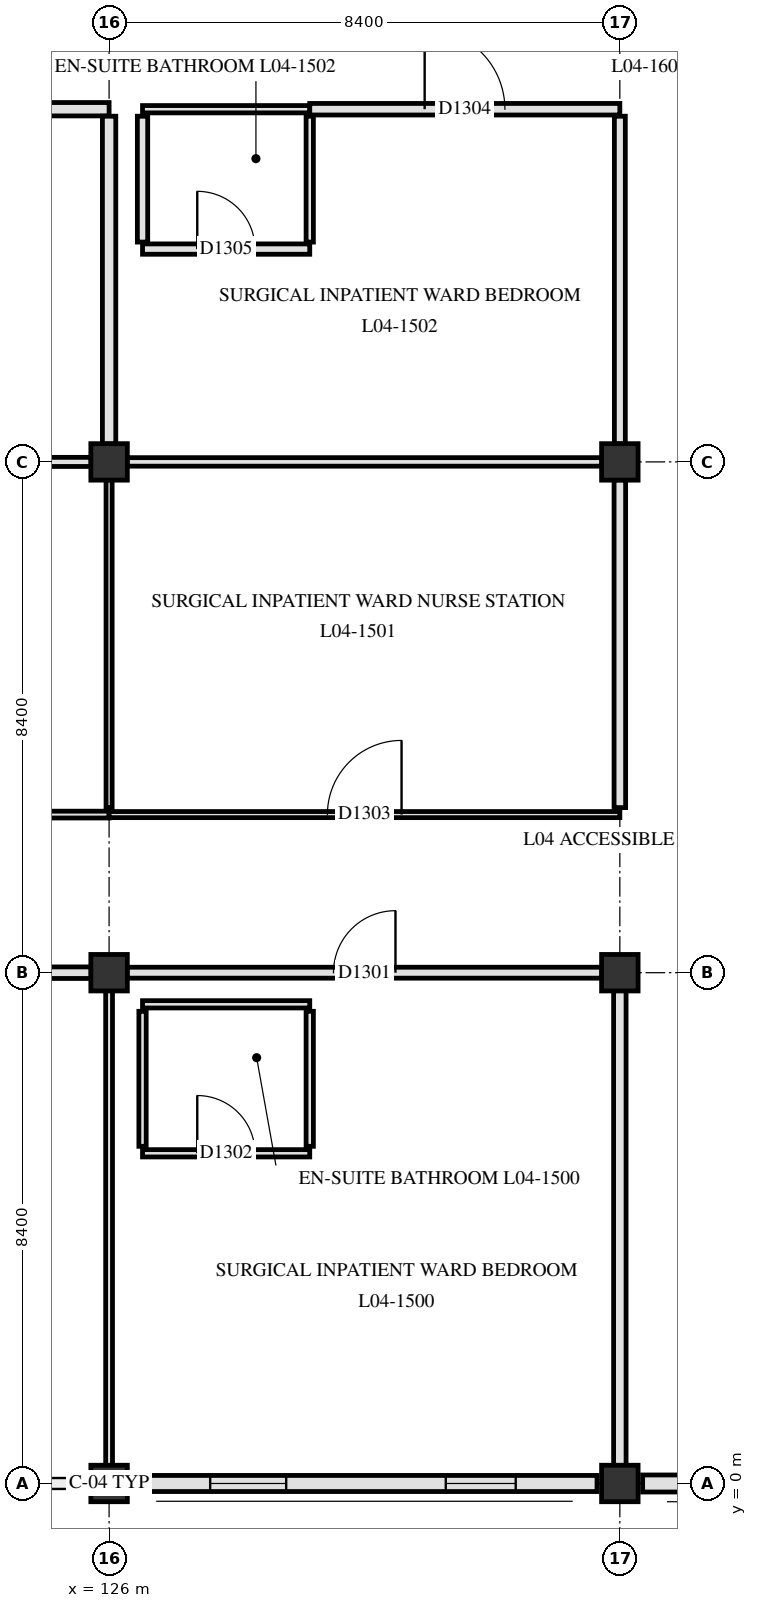
"""IFC4 building model, lengths in metres.
Left out: names, types, materials, properties, quantities, classifications, styles, units other than length and angle.
Written with IfcOpenShell. Run it as: python <this file> out.ifc"""

import sys

from ifc_helpers import new_model, si_unit, direction, frame, frame_2d, origin, origin_2d, place, context, subcontext, project, spatial, rectangle, extrude, element, fill, save


model = new_model("IFC4")
c1 = context("Model", 3, precision=1e-05, world=origin(), true_north=direction((0.0, 1.0)))
c2 = subcontext(c1, "Body", "Model", "MODEL_VIEW")
j1 = project(units=[si_unit("LENGTHUNIT", "METRE"), si_unit("PLANEANGLEUNIT", "RADIAN")], contexts=[c1])
p1 = place(None, origin())
s1 = spatial("IfcSite", under=j1, at=p1, CompositionType="ELEMENT")
p2 = place(p1, origin())
s2 = spatial("IfcBuilding", under=s1, at=p2, CompositionType="ELEMENT")
p3 = place(p2, frame((0.0, 0.0, 18.6)))
s3 = spatial("IfcBuildingStorey", under=s2, at=p3, CompositionType="ELEMENT", Elevation=18.6)
for number, where, z_axis, x_axis in (
    (1, (126.0, 0.0, 0.0), (0.0, 0.0, 1.0), (1.0, 0.0, 0.0)),
    (2, (126.0, 8.4, 0.0), (0.0, 0.0, 1.0), (1.0, 0.0, 0.0)),
    (3, (126.0, 16.8, 0.0), (0.0, 0.0, 1.0), (1.0, 0.0, 0.0)),
    (4, (134.4, 0.0, 0.0), (0.0, 0.0, 1.0), (1.0, 0.0, 0.0)),
    (5, (134.4, 8.4, 0.0), (0.0, 0.0, 1.0), (1.0, 0.0, 0.0)),
    (6, (134.4, 16.8, 0.0), (0.0, 0.0, 1.0), (1.0, 0.0, 0.0)),
):
    element("IfcColumn", number, at=place(p3, frame(where, z_axis=z_axis, x_axis=x_axis)), inside=s3, PredefinedType="COLUMN", context=c2, shape_type="SweptSolid", body=[
        extrude(rectangle(XDim=0.6, YDim=0.6, at=origin_2d()), origin(), (0.0, 0.0, 1.0), 3.9),
    ])
p4 = place(p3, frame((142.425, 0.0, 0.0), z_axis=(0.0, 0.0, 1.0), x_axis=(-1.0, 0.0, 0.0)))
e7 = element("IfcWall", 7, at=p4, inside=s3, PredefinedType="SOLIDWALL", context=c2, shape_type="SweptSolid", body=[
    extrude(rectangle(XDim=7.65, YDim=0.28, at=frame_2d((3.825, 0.0))), origin(), (0.0, 0.0, 1.0), 3.31),
])
p5 = place(p4, frame((0.962, 0.0, 0.85)))
e8 = element("IfcOpeningElement", 8, at=p5, cuts=e7, PredefinedType="OPENING", context=c2, shape_type="SweptSolid", body=[
    extrude(rectangle(XDim=1.9, YDim=1.42, at=frame_2d((0.95, 0.71))), frame((0.0, 0.15, 0.0), z_axis=(0.0, -1.0, 0.0), x_axis=(1.0, 0.0, 0.0)), (0.0, 0.0, 1.0), 0.3),
])
p6 = place(p4, frame((5.212, 0.0, 0.85)))
e9 = element("IfcOpeningElement", 9, at=p6, cuts=e7, PredefinedType="OPENING", context=c2, shape_type="SweptSolid", body=[
    extrude(rectangle(XDim=1.05, YDim=1.54, at=frame_2d((0.525, 0.77))), frame((0.0, 0.15, 0.0), z_axis=(0.0, -1.0, 0.0), x_axis=(1.0, 0.0, 0.0)), (0.0, 0.0, 1.0), 0.3),
])
p7 = place(p3, frame((134.025, 0.0, 0.0), z_axis=(0.0, 0.0, 1.0), x_axis=(-1.0, 0.0, 0.0)))
e10 = element("IfcWall", 10, at=p7, inside=s3, PredefinedType="SOLIDWALL", context=c2, shape_type="SweptSolid", body=[
    extrude(rectangle(XDim=7.65, YDim=0.265, at=frame_2d((3.825, 0.0))), origin(), (0.0, 0.0, 1.0), 3.31),
])
p8 = place(p7, frame((1.337, 0.0, 0.85)))
e11 = element("IfcOpeningElement", 11, at=p8, cuts=e10, PredefinedType="OPENING", context=c2, shape_type="SweptSolid", body=[
    extrude(rectangle(XDim=1.15, YDim=1.54, at=frame_2d((0.575, 0.77))), frame((0.0, 0.142, 0.0), z_axis=(0.0, -1.0, 0.0), x_axis=(1.0, 0.0, 0.0)), (0.0, 0.0, 1.0), 0.285),
])
p9 = place(p7, frame((5.113, 0.0, 0.85)))
e12 = element("IfcOpeningElement", 12, at=p9, cuts=e10, PredefinedType="OPENING", context=c2, shape_type="SweptSolid", body=[
    extrude(rectangle(XDim=1.25, YDim=1.54, at=frame_2d((0.625, 0.77))), frame((0.0, 0.142, 0.0), z_axis=(0.0, -1.0, 0.0), x_axis=(1.0, 0.0, 0.0)), (0.0, 0.0, 1.0), 0.285),
])
p10 = place(p3, frame((126.55, 5.43, 0.0), z_axis=(0.0, 0.0, 1.0), x_axis=(1.0, 0.0, 0.0)))
e13 = element("IfcWall", 13, at=p10, inside=s3, PredefinedType="PARTITIONING", context=c2, shape_type="SweptSolid", body=[
    extrude(rectangle(XDim=2.75, YDim=0.12, at=frame_2d((1.375, 0.0))), origin(), (0.0, 0.0, 1.0), 3.61),
])
p11 = place(p10, frame((0.9, 0.0, 0.0)))
e14 = element("IfcOpeningElement", 14, at=p11, cuts=e13, PredefinedType="OPENING", context=c2, shape_type="SweptSolid", body=[
    extrude(rectangle(XDim=0.95, YDim=2.1, at=frame_2d((0.475, 1.05))), frame((0.0, 0.07, 0.0), z_axis=(0.0, -1.0, 0.0), x_axis=(1.0, 0.0, 0.0)), (0.0, 0.0, 1.0), 0.14),
])
p12 = place(p3, frame((126.55, 7.88, 0.0), z_axis=(0.0, 0.0, 1.0), x_axis=(1.0, 0.0, 0.0)))
e15 = element("IfcWall", 15, at=p12, inside=s3, PredefinedType="PARTITIONING", context=c2, shape_type="SweptSolid", body=[
    extrude(rectangle(XDim=2.75, YDim=0.12, at=frame_2d((1.375, 0.0))), origin(), (0.0, 0.0, 1.0), 3.61),
])
p13 = place(p3, frame((117.895, 8.4, 0.0), z_axis=(0.0, 0.0, 1.0), x_axis=(1.0, 0.0, 0.0)))
e16 = element("IfcWall", 16, at=p13, inside=s3, PredefinedType="PARTITIONING", context=c2, shape_type="SweptSolid", body=[
    extrude(rectangle(XDim=7.81, YDim=0.19, at=frame_2d((3.905, 0.0))), origin(), (0.0, 0.0, 1.0), 3.16),
])
p14 = place(p13, frame((3.28, 0.0, 0.0)))
e17 = element("IfcOpeningElement", 17, at=p14, cuts=e16, PredefinedType="OPENING", context=c2, shape_type="SweptSolid", body=[
    extrude(rectangle(XDim=1.25, YDim=2.2, at=frame_2d((0.625, 1.1))), frame((0.0, 0.105, 0.0), z_axis=(0.0, -1.0, 0.0), x_axis=(1.0, 0.0, 0.0)), (0.0, 0.0, 1.0), 0.21),
])
p15 = place(p3, frame((126.295, 8.4, 0.0), z_axis=(0.0, 0.0, 1.0), x_axis=(1.0, 0.0, 0.0)))
e18 = element("IfcWall", 18, at=p15, inside=s3, PredefinedType="PARTITIONING", context=c2, shape_type="SweptSolid", body=[
    extrude(rectangle(XDim=7.81, YDim=0.18, at=frame_2d((3.905, 0.0))), origin(), (0.0, 0.0, 1.0), 3.16),
])
p16 = place(p15, frame((3.395, 0.0, 0.0)))
e19 = element("IfcOpeningElement", 19, at=p16, cuts=e18, PredefinedType="OPENING", context=c2, shape_type="SweptSolid", body=[
    extrude(rectangle(XDim=1.02, YDim=2.12, at=frame_2d((0.51, 1.06))), frame((0.0, 0.1, 0.0), z_axis=(0.0, -1.0, 0.0), x_axis=(1.0, 0.0, 0.0)), (0.0, 0.0, 1.0), 0.2),
])
p17 = place(p3, frame((117.6, 11.0, 0.0), z_axis=(0.0, 0.0, 1.0), x_axis=(1.0, 0.0, 0.0)))
e20 = element("IfcWall", 20, at=p17, inside=s3, PredefinedType="PARTITIONING", context=c2, shape_type="SweptSolid", body=[
    extrude(rectangle(XDim=8.4, YDim=0.112, at=frame_2d((4.2, 0.0))), origin(), (0.0, 0.0, 1.0), 3.26),
])
p18 = place(p17, frame((3.46, 0.0, 0.0)))
e21 = element("IfcOpeningElement", 21, at=p18, cuts=e20, PredefinedType="OPENING", context=c2, shape_type="SweptSolid", body=[
    extrude(rectangle(XDim=1.48, YDim=2.22, at=frame_2d((0.74, 1.11))), frame((0.0, 0.066, 0.0), z_axis=(0.0, -1.0, 0.0), x_axis=(1.0, 0.0, 0.0)), (0.0, 0.0, 1.0), 0.132),
])
p19 = place(p3, frame((126.0, 11.0, 0.0), z_axis=(0.0, 0.0, 1.0), x_axis=(1.0, 0.0, 0.0)))
e22 = element("IfcWall", 22, at=p19, inside=s3, PredefinedType="PARTITIONING", context=c2, shape_type="SweptSolid", body=[
    extrude(rectangle(XDim=8.4, YDim=0.1, at=frame_2d((4.2, 0.0))), origin(), (0.0, 0.0, 1.0), 3.26),
])
p20 = place(p19, frame((3.59, 0.0, 0.0)))
e23 = element("IfcOpeningElement", 23, at=p20, cuts=e22, PredefinedType="OPENING", context=c2, shape_type="SweptSolid", body=[
    extrude(rectangle(XDim=1.22, YDim=2.18, at=frame_2d((0.61, 1.09))), frame((0.0, 0.06, 0.0), z_axis=(0.0, -1.0, 0.0), x_axis=(1.0, 0.0, 0.0)), (0.0, 0.0, 1.0), 0.12),
])
p21 = place(p3, frame((117.895, 16.8, 0.0), z_axis=(0.0, 0.0, 1.0), x_axis=(1.0, 0.0, 0.0)))
e24 = element("IfcWall", 24, at=p21, inside=s3, PredefinedType="PARTITIONING", context=c2, shape_type="SweptSolid", body=[
    extrude(rectangle(XDim=7.81, YDim=0.15, at=frame_2d((3.905, 0.0))), origin(), (0.0, 0.0, 1.0), 3.16),
])
p22 = place(p3, frame((126.295, 16.8, 0.0), z_axis=(0.0, 0.0, 1.0), x_axis=(1.0, 0.0, 0.0)))
e25 = element("IfcWall", 25, at=p22, inside=s3, PredefinedType="PARTITIONING", context=c2, shape_type="SweptSolid", body=[
    extrude(rectangle(XDim=7.81, YDim=0.14, at=frame_2d((3.905, 0.0))), origin(), (0.0, 0.0, 1.0), 3.16),
])
p23 = place(p3, frame((126.55, 20.3, 0.0), z_axis=(0.0, 0.0, 1.0), x_axis=(1.0, 0.0, 0.0)))
e26 = element("IfcWall", 26, at=p23, inside=s3, PredefinedType="PARTITIONING", context=c2, shape_type="SweptSolid", body=[
    extrude(rectangle(XDim=2.75, YDim=0.17, at=frame_2d((1.375, 0.0))), origin(), (0.0, 0.0, 1.0), 3.61),
])
p24 = place(p23, frame((0.9, 0.0, 0.0)))
e27 = element("IfcOpeningElement", 27, at=p24, cuts=e26, PredefinedType="OPENING", context=c2, shape_type="SweptSolid", body=[
    extrude(rectangle(XDim=0.95, YDim=2.1, at=frame_2d((0.475, 1.05))), frame((0.0, 0.095, 0.0), z_axis=(0.0, -1.0, 0.0), x_axis=(1.0, 0.0, 0.0)), (0.0, 0.0, 1.0), 0.19),
])
p25 = place(p3, frame((120.9, 22.6, 0.0), z_axis=(0.0, 0.0, 1.0), x_axis=(1.0, 0.0, 0.0)))
e28 = element("IfcWall", 28, at=p25, inside=s3, PredefinedType="PARTITIONING", context=c2, shape_type="SweptSolid", body=[
    extrude(rectangle(XDim=5.1, YDim=0.22, at=frame_2d((2.55, 0.0))), origin(), (0.0, 0.0, 1.0), 3.26),
])
p26 = place(p25, frame((1.78, 0.0, 0.0)))
e29 = element("IfcOpeningElement", 29, at=p26, cuts=e28, PredefinedType="OPENING", context=c2, shape_type="SweptSolid", body=[
    extrude(rectangle(XDim=1.54, YDim=2.24, at=frame_2d((0.77, 1.12))), frame((0.0, 0.12, 0.0), z_axis=(0.0, -1.0, 0.0), x_axis=(1.0, 0.0, 0.0)), (0.0, 0.0, 1.0), 0.24),
])
p27 = place(p3, frame((126.55, 22.6, 0.0), z_axis=(0.0, 0.0, 1.0), x_axis=(1.0, 0.0, 0.0)))
e30 = element("IfcWall", 30, at=p27, inside=s3, PredefinedType="PARTITIONING", context=c2, shape_type="SweptSolid", body=[
    extrude(rectangle(XDim=2.75, YDim=0.12, at=frame_2d((1.375, 0.0))), origin(), (0.0, 0.0, 1.0), 3.61),
])
p28 = place(p3, frame((129.3, 22.6, 0.0), z_axis=(0.0, 0.0, 1.0), x_axis=(1.0, 0.0, 0.0)))
e31 = element("IfcWall", 31, at=p28, inside=s3, PredefinedType="PARTITIONING", context=c2, shape_type="SweptSolid", body=[
    extrude(rectangle(XDim=5.1, YDim=0.19, at=frame_2d((2.55, 0.0))), origin(), (0.0, 0.0, 1.0), 3.26),
])
p29 = place(p28, frame((1.89, 0.0, 0.0)))
e32 = element("IfcOpeningElement", 32, at=p29, cuts=e31, PredefinedType="OPENING", context=c2, shape_type="SweptSolid", body=[
    extrude(rectangle(XDim=1.32, YDim=2.18, at=frame_2d((0.66, 1.09))), frame((0.0, 0.105, 0.0), z_axis=(0.0, -1.0, 0.0), x_axis=(1.0, 0.0, 0.0)), (0.0, 0.0, 1.0), 0.21),
])
p30 = place(p3, frame((126.0, 0.295, 0.0), z_axis=(0.0, 0.0, 1.0), x_axis=(0.0, 1.0, 0.0)))
e33 = element("IfcWall", 33, at=p30, inside=s3, PredefinedType="PARTITIONING", context=c2, shape_type="SweptSolid", body=[
    extrude(rectangle(XDim=7.81, YDim=0.112, at=frame_2d((3.905, 0.0))), origin(), (0.0, 0.0, 1.0), 3.26),
])
p31 = place(p3, frame((126.0, 11.115, 0.0), z_axis=(0.0, 0.0, 1.0), x_axis=(0.0, 1.0, 0.0)))
e34 = element("IfcWall", 34, at=p31, inside=s3, PredefinedType="PARTITIONING", context=c2, shape_type="SweptSolid", body=[
    extrude(rectangle(XDim=5.39, YDim=0.1, at=frame_2d((2.695, 0.0))), origin(), (0.0, 0.0, 1.0), 3.26),
])
p32 = place(p3, frame((126.0, 17.095, 0.0), z_axis=(0.0, 0.0, 1.0), x_axis=(0.0, 1.0, 0.0)))
e35 = element("IfcWall", 35, at=p32, inside=s3, PredefinedType="PARTITIONING", context=c2, shape_type="SweptSolid", body=[
    extrude(rectangle(XDim=5.39, YDim=0.22, at=frame_2d((2.695, 0.0))), origin(), (0.0, 0.0, 1.0), 3.26),
])
p33 = place(p3, frame((126.55, 5.545, 0.0), z_axis=(0.0, 0.0, 1.0), x_axis=(0.0, 1.0, 0.0)))
e36 = element("IfcWall", 36, at=p33, inside=s3, PredefinedType="PARTITIONING", context=c2, shape_type="SweptSolid", body=[
    extrude(rectangle(XDim=2.22, YDim=0.12, at=frame_2d((1.11, 0.0))), origin(), (0.0, 0.0, 1.0), 3.31),
])
p34 = place(p3, frame((126.55, 20.415, 0.0), z_axis=(0.0, 0.0, 1.0), x_axis=(0.0, 1.0, 0.0)))
e37 = element("IfcWall", 37, at=p34, inside=s3, PredefinedType="PARTITIONING", context=c2, shape_type="SweptSolid", body=[
    extrude(rectangle(XDim=2.07, YDim=0.17, at=frame_2d((1.035, 0.0))), origin(), (0.0, 0.0, 1.0), 3.31),
])
p35 = place(p3, frame((129.3, 5.545, 0.0), z_axis=(0.0, 0.0, 1.0), x_axis=(0.0, 1.0, 0.0)))
e38 = element("IfcWall", 38, at=p35, inside=s3, PredefinedType="PARTITIONING", context=c2, shape_type="SweptSolid", body=[
    extrude(rectangle(XDim=2.22, YDim=0.12, at=frame_2d((1.11, 0.0))), origin(), (0.0, 0.0, 1.0), 3.31),
])
p36 = place(p3, frame((129.3, 20.415, 0.0), z_axis=(0.0, 0.0, 1.0), x_axis=(0.0, 1.0, 0.0)))
e39 = element("IfcWall", 39, at=p36, inside=s3, PredefinedType="PARTITIONING", context=c2, shape_type="SweptSolid", body=[
    extrude(rectangle(XDim=2.07, YDim=0.12, at=frame_2d((1.035, 0.0))), origin(), (0.0, 0.0, 1.0), 3.31),
])
p37 = place(p3, frame((134.4, 0.295, 0.0), z_axis=(0.0, 0.0, 1.0), x_axis=(0.0, 1.0, 0.0)))
e40 = element("IfcWall", 40, at=p37, inside=s3, PredefinedType="PARTITIONING", context=c2, shape_type="SweptSolid", body=[
    extrude(rectangle(XDim=7.81, YDim=0.205, at=frame_2d((3.905, 0.0))), origin(), (0.0, 0.0, 1.0), 3.26),
])
p38 = place(p3, frame((134.4, 11.115, 0.0), z_axis=(0.0, 0.0, 1.0), x_axis=(0.0, 1.0, 0.0)))
e41 = element("IfcWall", 41, at=p38, inside=s3, PredefinedType="PARTITIONING", context=c2, shape_type="SweptSolid", body=[
    extrude(rectangle(XDim=5.39, YDim=0.19, at=frame_2d((2.695, 0.0))), origin(), (0.0, 0.0, 1.0), 3.26),
])
p39 = place(p3, frame((134.4, 17.095, 0.0), z_axis=(0.0, 0.0, 1.0), x_axis=(0.0, 1.0, 0.0)))
e42 = element("IfcWall", 42, at=p39, inside=s3, PredefinedType="PARTITIONING", context=c2, shape_type="SweptSolid", body=[
    extrude(rectangle(XDim=5.39, YDim=0.18, at=frame_2d((2.695, 0.0))), origin(), (0.0, 0.0, 1.0), 3.26),
])
p40 = place(p8, origin())
e43 = element("IfcWindow", 43, at=p40, inside=s3, PartitioningType="SINGLE_PANEL", PredefinedType="WINDOW", context=c2, shape_type="SweptSolid", body=[
    extrude(rectangle(XDim=1.15, YDim=1.54, at=frame_2d((0.575, 0.77))), frame((0.0, 0.03, 0.0), z_axis=(0.0, -1.0, 0.0), x_axis=(1.0, 0.0, 0.0)), (0.0, 0.0, 1.0), 0.06),
])
fill(e11, e43)
p41 = place(p9, origin())
e44 = element("IfcWindow", 44, at=p41, inside=s3, PartitioningType="SINGLE_PANEL", PredefinedType="WINDOW", context=c2, shape_type="SweptSolid", body=[
    extrude(rectangle(XDim=1.25, YDim=1.54, at=frame_2d((0.625, 0.77))), frame((0.0, 0.03, 0.0), z_axis=(0.0, -1.0, 0.0), x_axis=(1.0, 0.0, 0.0)), (0.0, 0.0, 1.0), 0.06),
])
fill(e12, e44)
p42 = place(p16, origin())
e45 = element("IfcDoor", 45, at=p42, inside=s3, OperationType="SINGLE_SWING_RIGHT", PredefinedType="DOOR", context=c2, shape_type="SweptSolid", body=[
    extrude(rectangle(XDim=1.02, YDim=2.12, at=frame_2d((0.51, 1.06))), frame((0.0, 0.025, 0.0), z_axis=(0.0, -1.0, 0.0), x_axis=(1.0, 0.0, 0.0)), (0.0, 0.0, 1.0), 0.05),
])
fill(e19, e45)
p43 = place(p11, origin())
e46 = element("IfcDoor", 46, at=p43, inside=s3, OperationType="SINGLE_SWING_LEFT", PredefinedType="DOOR", context=c2, shape_type="SweptSolid", body=[
    extrude(rectangle(XDim=0.95, YDim=2.1, at=frame_2d((0.475, 1.05))), frame((0.0, 0.025, 0.0), z_axis=(0.0, -1.0, 0.0), x_axis=(1.0, 0.0, 0.0)), (0.0, 0.0, 1.0), 0.05),
])
fill(e14, e46)
p44 = place(p20, origin())
e47 = element("IfcDoor", 47, at=p44, inside=s3, OperationType="SINGLE_SWING_RIGHT", PredefinedType="DOOR", context=c2, shape_type="SweptSolid", body=[
    extrude(rectangle(XDim=1.22, YDim=2.18, at=frame_2d((0.61, 1.09))), frame((0.0, 0.025, 0.0), z_axis=(0.0, -1.0, 0.0), x_axis=(1.0, 0.0, 0.0)), (0.0, 0.0, 1.0), 0.05),
])
fill(e23, e47)
p45 = place(p29, origin())
e48 = element("IfcDoor", 48, at=p45, inside=s3, OperationType="SINGLE_SWING_LEFT", PredefinedType="DOOR", context=c2, shape_type="SweptSolid", body=[
    extrude(rectangle(XDim=1.32, YDim=2.18, at=frame_2d((0.66, 1.09))), frame((0.0, 0.025, 0.0), z_axis=(0.0, -1.0, 0.0), x_axis=(1.0, 0.0, 0.0)), (0.0, 0.0, 1.0), 0.05),
])
fill(e32, e48)
p46 = place(p24, origin())
e49 = element("IfcDoor", 49, at=p46, inside=s3, OperationType="SINGLE_SWING_LEFT", PredefinedType="DOOR", context=c2, shape_type="SweptSolid", body=[
    extrude(rectangle(XDim=0.95, YDim=2.1, at=frame_2d((0.475, 1.05))), frame((0.0, 0.025, 0.0), z_axis=(0.0, -1.0, 0.0), x_axis=(1.0, 0.0, 0.0)), (0.0, 0.0, 1.0), 0.05),
])
fill(e27, e49)
save(model, sys.argv[1])
